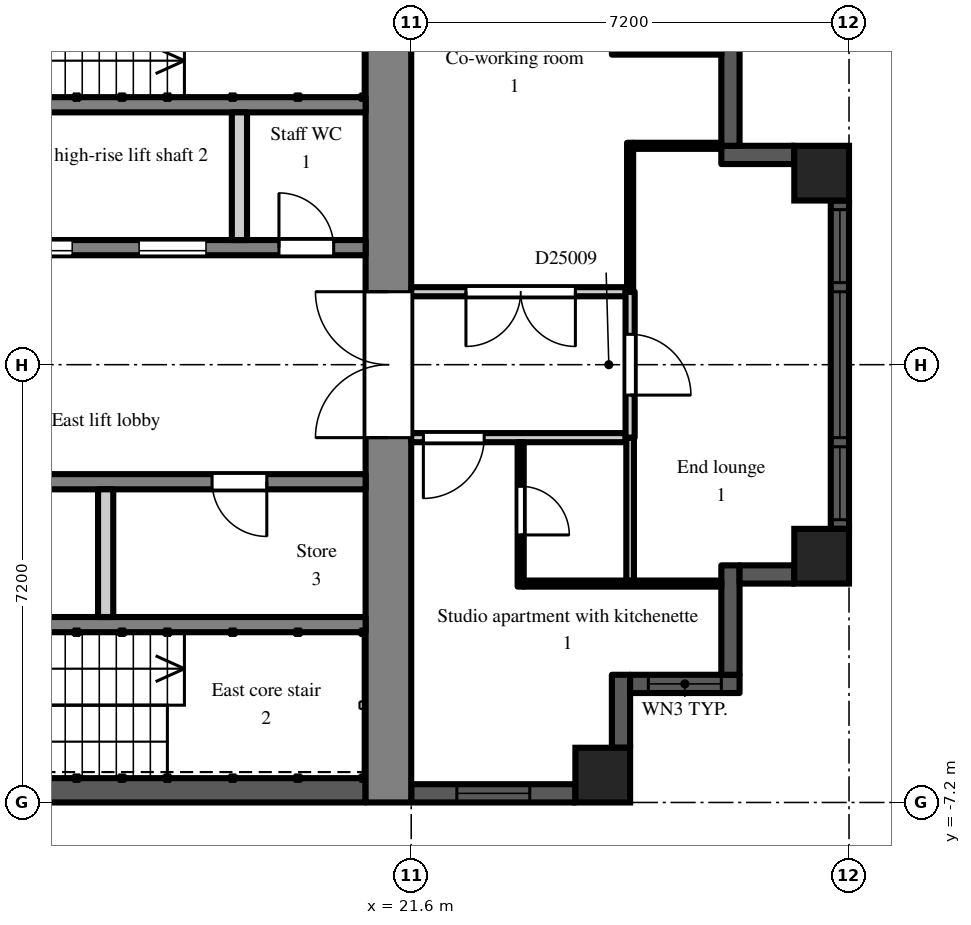
"""IFC4 building model, lengths in metres.
Left out: names, types, materials, properties, quantities, classifications, styles, units other than length and angle.
Written with IfcOpenShell. Run it as: python <this file> out.ifc"""

import sys

from ifc_helpers import new_model, si_unit, direction, frame, frame_2d, origin, origin_2d, place, context, subcontext, project, spatial, rectangle, extrude, element, fill, save


model = new_model("IFC4")
c1 = context("Model", 3, precision=1e-05, world=origin(), true_north=direction((0.0, 1.0)))
c2 = subcontext(c1, "Body", "Model", "MODEL_VIEW")
j1 = project(units=[si_unit("LENGTHUNIT", "METRE"), si_unit("PLANEANGLEUNIT", "RADIAN")], contexts=[c1])
p1 = place(None, origin())
s1 = spatial("IfcSite", under=j1, at=p1, CompositionType="ELEMENT")
p2 = place(p1, origin())
s2 = spatial("IfcBuilding", under=s1, at=p2, CompositionType="ELEMENT")
p3 = place(p2, frame((0.0, 0.0, 170.7)))
s3 = spatial("IfcBuildingStorey", under=s2, at=p3, CompositionType="ELEMENT", Elevation=170.7)
for number, where, z_axis, x_axis in (
    (1, (24.75, -6.75, 0.0), (0.0, 0.0, 1.0), (1.0, 0.0, 0.0)),
    (2, (28.35, -3.15, 0.0), (0.0, 0.0, 1.0), (1.0, 0.0, 0.0)),
    (3, (28.35, 3.15, 0.0), (0.0, 0.0, 1.0), (1.0, 0.0, 0.0)),
):
    element("IfcColumn", number, at=place(p3, frame(where, z_axis=z_axis, x_axis=x_axis)), inside=s3, PredefinedType="COLUMN", context=c2, shape_type="SweptSolid", body=[
        extrude(rectangle(XDim=0.9, YDim=0.9, at=origin_2d()), origin(), (0.0, 0.0, 1.0), 3.0),
    ])
p4 = place(p3, frame((21.6, -7.05, 0.0), z_axis=(0.0, 0.0, 1.0), x_axis=(1.0, 0.0, 0.0)))
e4 = element("IfcWall", 4, at=p4, inside=s3, PredefinedType="SOLIDWALL", context=c2, shape_type="SweptSolid", body=[
    extrude(rectangle(XDim=2.7, YDim=0.3, at=frame_2d((1.35, 0.0))), origin(), (0.0, 0.0, 1.0), 2.2),
])
p5 = place(p4, frame((0.75, 0.0, 0.2)))
e5 = element("IfcOpeningElement", 5, at=p5, cuts=e4, PredefinedType="OPENING", context=c2, shape_type="SweptSolid", body=[
    extrude(rectangle(XDim=1.2, YDim=1.85, at=frame_2d((0.6, 0.925))), frame((0.0, 0.16, 0.0), z_axis=(0.0, -1.0, 0.0), x_axis=(1.0, 0.0, 0.0)), (0.0, 0.0, 1.0), 0.32),
])
p6 = place(p3, frame((25.05, -6.3, 0.0), z_axis=(0.0, 0.0, 1.0), x_axis=(0.0, 1.0, 0.0)))
e6 = element("IfcWall", 6, at=p6, inside=s3, PredefinedType="SOLIDWALL", context=c2, shape_type="SweptSolid", body=[
    extrude(rectangle(XDim=1.2, YDim=0.3, at=frame_2d((0.6, 0.0))), origin(), (0.0, 0.0, 1.0), 2.6),
])
p7 = place(p3, frame((25.2, -5.25, 0.0), z_axis=(0.0, 0.0, 1.0), x_axis=(1.0, 0.0, 0.0)))
e7 = element("IfcWall", 7, at=p7, inside=s3, PredefinedType="SOLIDWALL", context=c2, shape_type="SweptSolid", body=[
    extrude(rectangle(XDim=1.8, YDim=0.3, at=frame_2d((0.9, 0.0))), origin(), (0.0, 0.0, 1.0), 2.6),
])
p8 = place(p7, frame((0.3, 0.0, 0.2)))
e8 = element("IfcOpeningElement", 8, at=p8, cuts=e7, PredefinedType="OPENING", context=c2, shape_type="SweptSolid", body=[
    extrude(rectangle(XDim=1.2, YDim=1.85, at=frame_2d((0.6, 0.925))), frame((0.0, 0.16, 0.0), z_axis=(0.0, -1.0, 0.0), x_axis=(1.0, 0.0, 0.0)), (0.0, 0.0, 1.0), 0.32),
])
p9 = place(p3, frame((26.85, -5.1, 0.0), z_axis=(0.0, 0.0, 1.0), x_axis=(0.0, 1.0, 0.0)))
e9 = element("IfcWall", 9, at=p9, inside=s3, PredefinedType="SOLIDWALL", context=c2, shape_type="SweptSolid", body=[
    extrude(rectangle(XDim=1.8, YDim=0.3, at=frame_2d((0.9, 0.0))), origin(), (0.0, 0.0, 1.0), 2.6),
])
p10 = place(p3, frame((27.0, -3.45, 0.0), z_axis=(0.0, 0.0, 1.0), x_axis=(1.0, 0.0, 0.0)))
e10 = element("IfcWall", 10, at=p10, inside=s3, PredefinedType="SOLIDWALL", context=c2, shape_type="SweptSolid", body=[
    extrude(rectangle(XDim=0.9, YDim=0.3, at=frame_2d((0.45, 0.0))), origin(), (0.0, 0.0, 1.0), 2.6),
])
p11 = place(p3, frame((28.65, -2.7, 0.0), z_axis=(0.0, 0.0, 1.0), x_axis=(0.0, 1.0, 0.0)))
e11 = element("IfcWall", 11, at=p11, inside=s3, PredefinedType="SOLIDWALL", context=c2, shape_type="SweptSolid", body=[
    extrude(rectangle(XDim=5.4, YDim=0.3, at=frame_2d((2.7, 0.0))), origin(), (0.0, 0.0, 1.0), 2.2),
])
p12 = place(p11, frame((1.5, 0.0, 0.2)))
e12 = element("IfcOpeningElement", 12, at=p12, cuts=e11, PredefinedType="OPENING", context=c2, shape_type="SweptSolid", body=[
    extrude(rectangle(XDim=2.4, YDim=1.85, at=frame_2d((1.2, 0.925))), frame((0.0, 0.16, 0.0), z_axis=(0.0, -1.0, 0.0), x_axis=(1.0, 0.0, 0.0)), (0.0, 0.0, 1.0), 0.32),
])
p13 = place(p11, frame((0.15, 0.0, 0.2)))
e13 = element("IfcOpeningElement", 13, at=p13, cuts=e11, PredefinedType="OPENING", context=c2, shape_type="SweptSolid", body=[
    extrude(rectangle(XDim=1.2, YDim=1.85, at=frame_2d((0.6, 0.925))), frame((0.0, 0.16, 0.0), z_axis=(0.0, -1.0, 0.0), x_axis=(1.0, 0.0, 0.0)), (0.0, 0.0, 1.0), 0.32),
])
p14 = place(p11, frame((4.05, 0.0, 0.2)))
e14 = element("IfcOpeningElement", 14, at=p14, cuts=e11, PredefinedType="OPENING", context=c2, shape_type="SweptSolid", body=[
    extrude(rectangle(XDim=1.2, YDim=1.85, at=frame_2d((0.6, 0.925))), frame((0.0, 0.16, 0.0), z_axis=(0.0, -1.0, 0.0), x_axis=(1.0, 0.0, 0.0)), (0.0, 0.0, 1.0), 0.32),
])
p15 = place(p3, frame((27.9, 3.45, 0.0), z_axis=(0.0, 0.0, 1.0), x_axis=(-1.0, 0.0, 0.0)))
e15 = element("IfcWall", 15, at=p15, inside=s3, PredefinedType="SOLIDWALL", context=c2, shape_type="SweptSolid", body=[
    extrude(rectangle(XDim=1.2, YDim=0.3, at=frame_2d((0.6, 0.0))), origin(), (0.0, 0.0, 1.0), 2.6),
])
p16 = place(p3, frame((26.85, 3.6, 0.0), z_axis=(0.0, 0.0, 1.0), x_axis=(0.0, 1.0, 0.0)))
e16 = element("IfcWall", 16, at=p16, inside=s3, PredefinedType="SOLIDWALL", context=c2, shape_type="SweptSolid", body=[
    extrude(rectangle(XDim=1.8, YDim=0.3, at=frame_2d((0.9, 0.0))), origin(), (0.0, 0.0, 1.0), 2.6),
])
p17 = place(p3, frame((26.7, 5.25, 0.0), z_axis=(0.0, 0.0, 1.0), x_axis=(-1.0, 0.0, 0.0)))
e17 = element("IfcWall", 17, at=p17, inside=s3, PredefinedType="SOLIDWALL", context=c2, shape_type="SweptSolid", body=[
    extrude(rectangle(XDim=1.8, YDim=0.3, at=frame_2d((0.9, 0.0))), origin(), (0.0, 0.0, 1.0), 2.6),
])
p18 = place(p3, frame((21.225, -7.2, 0.0), z_axis=(0.0, 0.0, 1.0), x_axis=(0.0, 1.0, 0.0)))
e18 = element("IfcWall", 18, at=p18, inside=s3, PredefinedType="SHEAR", context=c2, shape_type="SweptSolid", body=[
    extrude(rectangle(XDim=14.4, YDim=0.75, at=frame_2d((7.2, 0.0))), origin(), (0.0, 0.0, 1.0), 2.6),
])
p19 = place(p18, frame((6.0, 0.0, 0.0)))
e19 = element("IfcOpeningElement", 19, at=p19, cuts=e18, PredefinedType="OPENING", context=c2, shape_type="SweptSolid", body=[
    extrude(rectangle(XDim=2.4, YDim=2.2, at=frame_2d((1.2, 1.1))), frame((0.0, 0.385, 0.0), z_axis=(0.0, -1.0, 0.0), x_axis=(1.0, 0.0, 0.0)), (0.0, 0.0, 1.0), 0.77),
])
p20 = place(p3, frame((7.9, 1.925, 0.0), z_axis=(0.0, 0.0, 1.0), x_axis=(1.0, 0.0, 0.0)))
e20 = element("IfcWall", 20, at=p20, inside=s3, PredefinedType="SHEAR", context=c2, shape_type="SweptSolid", body=[
    extrude(rectangle(XDim=12.95, YDim=0.25, at=frame_2d((6.475, 0.0))), origin(), (0.0, 0.0, 1.0), 2.6),
])
p21 = place(p20, frame((4.825, 0.0, 0.0)))
e21 = element("IfcOpeningElement", 21, at=p21, cuts=e20, PredefinedType="OPENING", context=c2, shape_type="SweptSolid", body=[
    extrude(rectangle(XDim=1.1, YDim=2.1, at=frame_2d((0.55, 1.05))), frame((0.0, 0.135, 0.0), z_axis=(0.0, -1.0, 0.0), x_axis=(1.0, 0.0, 0.0)), (0.0, 0.0, 1.0), 0.27),
])
p22 = place(p20, frame((7.025, 0.0, 0.0)))
e22 = element("IfcOpeningElement", 22, at=p22, cuts=e20, PredefinedType="OPENING", context=c2, shape_type="SweptSolid", body=[
    extrude(rectangle(XDim=1.1, YDim=2.1, at=frame_2d((0.55, 1.05))), frame((0.0, 0.135, 0.0), z_axis=(0.0, -1.0, 0.0), x_axis=(1.0, 0.0, 0.0)), (0.0, 0.0, 1.0), 0.27),
])
p23 = place(p20, frame((9.225, 0.0, 0.0)))
e23 = element("IfcOpeningElement", 23, at=p23, cuts=e20, PredefinedType="OPENING", context=c2, shape_type="SweptSolid", body=[
    extrude(rectangle(XDim=1.1, YDim=2.1, at=frame_2d((0.55, 1.05))), frame((0.0, 0.135, 0.0), z_axis=(0.0, -1.0, 0.0), x_axis=(1.0, 0.0, 0.0)), (0.0, 0.0, 1.0), 0.27),
])
p24 = place(p20, frame((0.525, 0.0, 0.0)))
e24 = element("IfcOpeningElement", 24, at=p24, cuts=e20, PredefinedType="OPENING", context=c2, shape_type="SweptSolid", body=[
    extrude(rectangle(XDim=0.9, YDim=2.1, at=frame_2d((0.45, 1.05))), frame((0.0, 0.135, 0.0), z_axis=(0.0, -1.0, 0.0), x_axis=(1.0, 0.0, 0.0)), (0.0, 0.0, 1.0), 0.27),
])
p25 = place(p20, frame((2.625, 0.0, 0.0)))
e25 = element("IfcOpeningElement", 25, at=p25, cuts=e20, PredefinedType="OPENING", context=c2, shape_type="SweptSolid", body=[
    extrude(rectangle(XDim=1.1, YDim=2.1, at=frame_2d((0.55, 1.05))), frame((0.0, 0.135, 0.0), z_axis=(0.0, -1.0, 0.0), x_axis=(1.0, 0.0, 0.0)), (0.0, 0.0, 1.0), 0.27),
])
p26 = place(p20, frame((11.525, 0.0, 0.0)))
e26 = element("IfcOpeningElement", 26, at=p26, cuts=e20, PredefinedType="OPENING", context=c2, shape_type="SweptSolid", body=[
    extrude(rectangle(XDim=0.9, YDim=2.1, at=frame_2d((0.45, 1.05))), frame((0.0, 0.135, 0.0), z_axis=(0.0, -1.0, 0.0), x_axis=(1.0, 0.0, 0.0)), (0.0, 0.0, 1.0), 0.27),
])
p27 = place(p3, frame((12.3, 4.275, 0.0), z_axis=(0.0, 0.0, 1.0), x_axis=(1.0, 0.0, 0.0)))
e27 = element("IfcWall", 27, at=p27, inside=s3, PredefinedType="SHEAR", context=c2, shape_type="SweptSolid", body=[
    extrude(rectangle(XDim=8.55, YDim=0.25, at=frame_2d((4.275, 0.0))), origin(), (0.0, 0.0, 1.0), 2.6),
])
p28 = place(p3, frame((18.775, 2.05, 0.0), z_axis=(0.0, 0.0, 1.0), x_axis=(0.0, 1.0, 0.0)))
e28 = element("IfcWall", 28, at=p28, inside=s3, PredefinedType="PARTITIONING", context=c2, shape_type="SweptSolid", body=[
    extrude(rectangle(XDim=2.1, YDim=0.25, at=frame_2d((1.05, 0.0))), origin(), (0.0, 0.0, 1.0), 2.6),
])
p29 = place(p3, frame((7.9, -7.0, 0.0), z_axis=(0.0, 0.0, 1.0), x_axis=(1.0, 0.0, 0.0)))
e29 = element("IfcWall", 29, at=p29, inside=s3, PredefinedType="SHEAR", context=c2, shape_type="SweptSolid", body=[
    extrude(rectangle(XDim=12.95, YDim=0.4, at=frame_2d((6.475, 0.0))), origin(), (0.0, 0.0, 1.0), 2.6),
])
p30 = place(p3, frame((7.9, -1.925, 0.0), z_axis=(0.0, 0.0, 1.0), x_axis=(1.0, 0.0, 0.0)))
e30 = element("IfcWall", 30, at=p30, inside=s3, PredefinedType="SHEAR", context=c2, shape_type="SweptSolid", body=[
    extrude(rectangle(XDim=12.95, YDim=0.25, at=frame_2d((6.475, 0.0))), origin(), (0.0, 0.0, 1.0), 2.6),
])
p31 = place(p30, frame((0.525, 0.0, 0.0)))
e31 = element("IfcOpeningElement", 31, at=p31, cuts=e30, PredefinedType="OPENING", context=c2, shape_type="SweptSolid", body=[
    extrude(rectangle(XDim=0.9, YDim=2.1, at=frame_2d((0.45, 1.05))), frame((0.0, 0.135, 0.0), z_axis=(0.0, -1.0, 0.0), x_axis=(1.0, 0.0, 0.0)), (0.0, 0.0, 1.0), 0.27),
])
p32 = place(p30, frame((2.625, 0.0, 0.0)))
e32 = element("IfcOpeningElement", 32, at=p32, cuts=e30, PredefinedType="OPENING", context=c2, shape_type="SweptSolid", body=[
    extrude(rectangle(XDim=1.1, YDim=2.1, at=frame_2d((0.55, 1.05))), frame((0.0, 0.135, 0.0), z_axis=(0.0, -1.0, 0.0), x_axis=(1.0, 0.0, 0.0)), (0.0, 0.0, 1.0), 0.27),
])
p33 = place(p30, frame((6.025, 0.0, 0.0)))
e33 = element("IfcOpeningElement", 33, at=p33, cuts=e30, PredefinedType="OPENING", context=c2, shape_type="SweptSolid", body=[
    extrude(rectangle(XDim=0.9, YDim=2.1, at=frame_2d((0.45, 1.05))), frame((0.0, 0.135, 0.0), z_axis=(0.0, -1.0, 0.0), x_axis=(1.0, 0.0, 0.0)), (0.0, 0.0, 1.0), 0.27),
])
p34 = place(p30, frame((10.425, 0.0, 0.0)))
e34 = element("IfcOpeningElement", 34, at=p34, cuts=e30, PredefinedType="OPENING", context=c2, shape_type="SweptSolid", body=[
    extrude(rectangle(XDim=0.9, YDim=2.1, at=frame_2d((0.45, 1.05))), frame((0.0, 0.135, 0.0), z_axis=(0.0, -1.0, 0.0), x_axis=(1.0, 0.0, 0.0)), (0.0, 0.0, 1.0), 0.27),
])
p35 = place(p3, frame((12.3, -4.275, 0.0), z_axis=(0.0, 0.0, 1.0), x_axis=(1.0, 0.0, 0.0)))
e35 = element("IfcWall", 35, at=p35, inside=s3, PredefinedType="SHEAR", context=c2, shape_type="SweptSolid", body=[
    extrude(rectangle(XDim=8.55, YDim=0.25, at=frame_2d((4.275, 0.0))), origin(), (0.0, 0.0, 1.0), 2.6),
])
p36 = place(p3, frame((16.575, -2.05, 0.0), z_axis=(0.0, 0.0, 1.0), x_axis=(0.0, -1.0, 0.0)))
e36 = element("IfcWall", 36, at=p36, inside=s3, PredefinedType="PARTITIONING", context=c2, shape_type="SweptSolid", body=[
    extrude(rectangle(XDim=2.1, YDim=0.25, at=frame_2d((1.05, 0.0))), origin(), (0.0, 0.0, 1.0), 2.6),
])
p37 = place(p3, frame((21.6, -1.2, 0.0), z_axis=(0.0, 0.0, 1.0), x_axis=(1.0, 0.0, 0.0)))
e37 = element("IfcWall", 37, at=p37, inside=s3, PredefinedType="PARTITIONING", context=c2, shape_type="SweptSolid", body=[
    extrude(rectangle(XDim=3.525, YDim=0.15, at=frame_2d((1.762, 0.0))), origin(), (0.0, 0.0, 1.0), 2.6),
])
p38 = place(p37, frame((0.2, 0.0, 0.0)))
e38 = element("IfcOpeningElement", 38, at=p38, cuts=e37, PredefinedType="OPENING", context=c2, shape_type="SweptSolid", body=[
    extrude(rectangle(XDim=1.0, YDim=2.1, at=frame_2d((0.5, 1.05))), frame((0.0, 0.085, 0.0), z_axis=(0.0, -1.0, 0.0), x_axis=(1.0, 0.0, 0.0)), (0.0, 0.0, 1.0), 0.17),
])
p39 = place(p3, frame((21.6, 1.2, 0.0), z_axis=(0.0, 0.0, 1.0), x_axis=(1.0, 0.0, 0.0)))
e39 = element("IfcWall", 39, at=p39, inside=s3, PredefinedType="PARTITIONING", context=c2, shape_type="SweptSolid", body=[
    extrude(rectangle(XDim=3.525, YDim=0.15, at=frame_2d((1.762, 0.0))), origin(), (0.0, 0.0, 1.0), 2.6),
])
p40 = place(p39, frame((0.9, 0.0, 0.0)))
e40 = element("IfcOpeningElement", 40, at=p40, cuts=e39, PredefinedType="OPENING", context=c2, shape_type="SweptSolid", body=[
    extrude(rectangle(XDim=1.8, YDim=2.1, at=frame_2d((0.9, 1.05))), frame((0.0, 0.085, 0.0), z_axis=(0.0, -1.0, 0.0), x_axis=(1.0, 0.0, 0.0)), (0.0, 0.0, 1.0), 0.17),
])
p41 = place(p3, frame((23.4, -3.65, 0.0), z_axis=(0.0, 0.0, 1.0), x_axis=(0.0, 1.0, 0.0)))
e41 = element("IfcWall", 41, at=p41, inside=s3, PredefinedType="PARTITIONING", context=c2, shape_type="SweptSolid", body=[
    extrude(rectangle(XDim=2.375, YDim=0.1, at=frame_2d((1.188, 0.0))), origin(), (0.0, 0.0, 1.0), 2.6),
])
p42 = place(p41, frame((0.85, 0.0, 0.0)))
e42 = element("IfcOpeningElement", 42, at=p42, cuts=e41, PredefinedType="OPENING", context=c2, shape_type="SweptSolid", body=[
    extrude(rectangle(XDim=0.8, YDim=2.1, at=frame_2d((0.4, 1.05))), frame((0.0, 0.06, 0.0), z_axis=(0.0, -1.0, 0.0), x_axis=(1.0, 0.0, 0.0)), (0.0, 0.0, 1.0), 0.12),
])
p43 = place(p3, frame((23.45, -3.6, 0.0), z_axis=(0.0, 0.0, 1.0), x_axis=(1.0, 0.0, 0.0)))
e43 = element("IfcWall", 43, at=p43, inside=s3, PredefinedType="PARTITIONING", context=c2, shape_type="SweptSolid", body=[
    extrude(rectangle(XDim=3.25, YDim=0.1, at=frame_2d((1.625, 0.0))), origin(), (0.0, 0.0, 1.0), 2.6),
])
p44 = place(p3, frame((25.2, -3.55, 0.0), z_axis=(0.0, 0.0, 1.0), x_axis=(0.0, 1.0, 0.0)))
e44 = element("IfcWall", 44, at=p44, inside=s3, PredefinedType="PARTITIONING", context=c2, shape_type="SweptSolid", body=[
    extrude(rectangle(XDim=2.35, YDim=0.125, at=frame_2d((1.175, 0.0))), origin(), (0.0, 0.0, 1.0), 2.6),
])
p45 = place(p3, frame((25.2, -1.2, 0.0), z_axis=(0.0, 0.0, 1.0), x_axis=(0.0, 1.0, 0.0)))
e45 = element("IfcWall", 45, at=p45, inside=s3, PredefinedType="PARTITIONING", context=c2, shape_type="SweptSolid", body=[
    extrude(rectangle(XDim=2.4, YDim=0.15, at=frame_2d((1.2, 0.0))), origin(), (0.0, 0.0, 1.0), 2.6),
])
p46 = place(p45, frame((0.7, 0.0, 0.0)))
e46 = element("IfcOpeningElement", 46, at=p46, cuts=e45, PredefinedType="OPENING", context=c2, shape_type="SweptSolid", body=[
    extrude(rectangle(XDim=1.0, YDim=2.1, at=frame_2d((0.5, 1.05))), frame((0.0, 0.085, 0.0), z_axis=(0.0, -1.0, 0.0), x_axis=(1.0, 0.0, 0.0)), (0.0, 0.0, 1.0), 0.17),
])
p47 = place(p3, frame((25.2, 1.2, 0.0), z_axis=(0.0, 0.0, 1.0), x_axis=(0.0, 1.0, 0.0)))
e47 = element("IfcWall", 47, at=p47, inside=s3, PredefinedType="PARTITIONING", context=c2, shape_type="SweptSolid", body=[
    extrude(rectangle(XDim=2.45, YDim=0.1, at=frame_2d((1.225, 0.0))), origin(), (0.0, 0.0, 1.0), 2.6),
])
p48 = place(p3, frame((25.25, 3.6, 0.0), z_axis=(0.0, 0.0, 1.0), x_axis=(1.0, 0.0, 0.0)))
e48 = element("IfcWall", 48, at=p48, inside=s3, PredefinedType="PARTITIONING", context=c2, shape_type="SweptSolid", body=[
    extrude(rectangle(XDim=1.45, YDim=0.1, at=frame_2d((0.725, 0.0))), origin(), (0.0, 0.0, 1.0), 2.6),
])
p49 = place(p5, origin())
e49 = element("IfcWindow", 49, at=p49, inside=s3, PartitioningType="SINGLE_PANEL", PredefinedType="WINDOW", context=c2, shape_type="SweptSolid", body=[
    extrude(rectangle(XDim=1.2, YDim=1.85, at=frame_2d((0.6, 0.925))), frame((0.0, 0.03, 0.0), z_axis=(0.0, -1.0, 0.0), x_axis=(1.0, 0.0, 0.0)), (0.0, 0.0, 1.0), 0.06),
])
fill(e5, e49)
p50 = place(p8, origin())
e50 = element("IfcWindow", 50, at=p50, inside=s3, PartitioningType="SINGLE_PANEL", PredefinedType="WINDOW", context=c2, shape_type="SweptSolid", body=[
    extrude(rectangle(XDim=1.2, YDim=1.85, at=frame_2d((0.6, 0.925))), frame((0.0, 0.03, 0.0), z_axis=(0.0, -1.0, 0.0), x_axis=(1.0, 0.0, 0.0)), (0.0, 0.0, 1.0), 0.06),
])
fill(e8, e50)
p51 = place(p12, origin())
e51 = element("IfcWindow", 51, at=p51, inside=s3, PartitioningType="SINGLE_PANEL", PredefinedType="WINDOW", context=c2, shape_type="SweptSolid", body=[
    extrude(rectangle(XDim=2.4, YDim=1.85, at=frame_2d((1.2, 0.925))), frame((0.0, 0.03, 0.0), z_axis=(0.0, -1.0, 0.0), x_axis=(1.0, 0.0, 0.0)), (0.0, 0.0, 1.0), 0.06),
])
fill(e12, e51)
p52 = place(p13, origin())
e52 = element("IfcWindow", 52, at=p52, inside=s3, PartitioningType="SINGLE_PANEL", PredefinedType="WINDOW", context=c2, shape_type="SweptSolid", body=[
    extrude(rectangle(XDim=1.2, YDim=1.85, at=frame_2d((0.6, 0.925))), frame((0.0, 0.03, 0.0), z_axis=(0.0, -1.0, 0.0), x_axis=(1.0, 0.0, 0.0)), (0.0, 0.0, 1.0), 0.06),
])
fill(e13, e52)
p53 = place(p14, origin())
e53 = element("IfcWindow", 53, at=p53, inside=s3, PartitioningType="SINGLE_PANEL", PredefinedType="WINDOW", context=c2, shape_type="SweptSolid", body=[
    extrude(rectangle(XDim=1.2, YDim=1.85, at=frame_2d((0.6, 0.925))), frame((0.0, 0.03, 0.0), z_axis=(0.0, -1.0, 0.0), x_axis=(1.0, 0.0, 0.0)), (0.0, 0.0, 1.0), 0.06),
])
fill(e14, e53)
p54 = place(p22, origin())
e54 = element("IfcDoor", 54, at=p54, inside=s3, OperationType="SLIDING_TO_LEFT", PredefinedType="DOOR", context=c2, shape_type="SweptSolid", body=[
    extrude(rectangle(XDim=1.1, YDim=2.1, at=frame_2d((0.55, 1.05))), frame((0.0, 0.025, 0.0), z_axis=(0.0, -1.0, 0.0), x_axis=(1.0, 0.0, 0.0)), (0.0, 0.0, 1.0), 0.05),
])
fill(e22, e54)
p55 = place(p23, origin())
e55 = element("IfcDoor", 55, at=p55, inside=s3, OperationType="SLIDING_TO_LEFT", PredefinedType="DOOR", context=c2, shape_type="SweptSolid", body=[
    extrude(rectangle(XDim=1.1, YDim=2.1, at=frame_2d((0.55, 1.05))), frame((0.0, 0.025, 0.0), z_axis=(0.0, -1.0, 0.0), x_axis=(1.0, 0.0, 0.0)), (0.0, 0.0, 1.0), 0.05),
])
fill(e23, e55)
p56 = place(p19, origin())
e56 = element("IfcDoor", 56, at=p56, inside=s3, OperationType="DOUBLE_DOOR_DOUBLE_SWING", PredefinedType="DOOR", context=c2, shape_type="SweptSolid", body=[
    extrude(rectangle(XDim=2.4, YDim=2.2, at=frame_2d((1.2, 1.1))), frame((0.0, 0.025, 0.0), z_axis=(0.0, -1.0, 0.0), x_axis=(1.0, 0.0, 0.0)), (0.0, 0.0, 1.0), 0.05),
])
fill(e19, e56)
p57 = place(p26, origin())
e57 = element("IfcDoor", 57, at=p57, inside=s3, OperationType="SINGLE_SWING_LEFT", PredefinedType="DOOR", context=c2, shape_type="SweptSolid", body=[
    extrude(rectangle(XDim=0.9, YDim=2.1, at=frame_2d((0.45, 1.05))), frame((0.0, 0.025, 0.0), z_axis=(0.0, -1.0, 0.0), x_axis=(1.0, 0.0, 0.0)), (0.0, 0.0, 1.0), 0.05),
])
fill(e26, e57)
p58 = place(p34, frame((0.9, 0.0, 0.0), z_axis=(0.0, 0.0, 1.0), x_axis=(-1.0, 0.0, 0.0)))
e58 = element("IfcDoor", 58, at=p58, inside=s3, OperationType="SINGLE_SWING_LEFT", PredefinedType="DOOR", context=c2, shape_type="SweptSolid", body=[
    extrude(rectangle(XDim=0.9, YDim=2.1, at=frame_2d((0.45, 1.05))), frame((0.0, 0.025, 0.0), z_axis=(0.0, -1.0, 0.0), x_axis=(1.0, 0.0, 0.0)), (0.0, 0.0, 1.0), 0.05),
])
fill(e34, e58)
p59 = place(p46, frame((1.0, 0.0, 0.0), z_axis=(0.0, 0.0, 1.0), x_axis=(-1.0, 0.0, 0.0)))
e59 = element("IfcDoor", 59, at=p59, inside=s3, OperationType="SINGLE_SWING_RIGHT", PredefinedType="DOOR", context=c2, shape_type="SweptSolid", body=[
    extrude(rectangle(XDim=1.0, YDim=2.1, at=frame_2d((0.5, 1.05))), frame((0.0, 0.025, 0.0), z_axis=(0.0, -1.0, 0.0), x_axis=(1.0, 0.0, 0.0)), (0.0, 0.0, 1.0), 0.05),
])
fill(e46, e59)
p60 = place(p40, frame((1.8, 0.0, 0.0), z_axis=(0.0, 0.0, 1.0), x_axis=(-1.0, 0.0, 0.0)))
e60 = element("IfcDoor", 60, at=p60, inside=s3, OperationType="DOUBLE_DOOR_DOUBLE_SWING", PredefinedType="DOOR", context=c2, shape_type="SweptSolid", body=[
    extrude(rectangle(XDim=1.8, YDim=2.1, at=frame_2d((0.9, 1.05))), frame((0.0, 0.025, 0.0), z_axis=(0.0, -1.0, 0.0), x_axis=(1.0, 0.0, 0.0)), (0.0, 0.0, 1.0), 0.05),
])
fill(e40, e60)
p61 = place(p42, frame((0.8, 0.0, 0.0), z_axis=(0.0, 0.0, 1.0), x_axis=(-1.0, 0.0, 0.0)))
e61 = element("IfcDoor", 61, at=p61, inside=s3, OperationType="SINGLE_SWING_RIGHT", PredefinedType="DOOR", context=c2, shape_type="SweptSolid", body=[
    extrude(rectangle(XDim=0.8, YDim=2.1, at=frame_2d((0.4, 1.05))), frame((0.0, 0.025, 0.0), z_axis=(0.0, -1.0, 0.0), x_axis=(1.0, 0.0, 0.0)), (0.0, 0.0, 1.0), 0.05),
])
fill(e42, e61)
p62 = place(p38, frame((1.0, 0.0, 0.0), z_axis=(0.0, 0.0, 1.0), x_axis=(-1.0, 0.0, 0.0)))
e62 = element("IfcDoor", 62, at=p62, inside=s3, OperationType="SINGLE_SWING_RIGHT", PredefinedType="DOOR", context=c2, shape_type="SweptSolid", body=[
    extrude(rectangle(XDim=1.0, YDim=2.1, at=frame_2d((0.5, 1.05))), frame((0.0, 0.025, 0.0), z_axis=(0.0, -1.0, 0.0), x_axis=(1.0, 0.0, 0.0)), (0.0, 0.0, 1.0), 0.05),
])
fill(e38, e62)
save(model, sys.argv[1])
